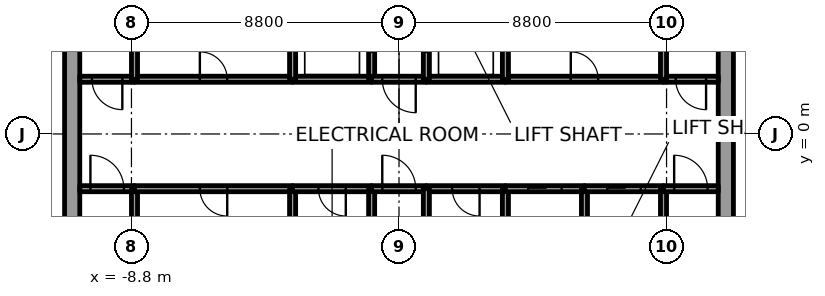
"""IFC4 building model, lengths in metres.
Left out: names, types, materials, properties, quantities, classifications, styles, units other than length and angle.
Written with IfcOpenShell. Run it as: python <this file> out.ifc"""

import sys

from ifc_helpers import new_model, si_unit, direction, frame, frame_2d, origin, place, context, subcontext, project, spatial, rectangle, extrude, element, fill, save


model = new_model("IFC4")
c1 = context("Model", 3, precision=1e-05, world=origin(), true_north=direction((0.0, 1.0)))
c2 = subcontext(c1, "Body", "Model", "MODEL_VIEW")
j1 = project(units=[si_unit("LENGTHUNIT", "METRE"), si_unit("PLANEANGLEUNIT", "RADIAN")], contexts=[c1])
p1 = place(None, origin())
s1 = spatial("IfcSite", under=j1, at=p1, CompositionType="ELEMENT")
p2 = place(p1, origin())
s2 = spatial("IfcBuilding", under=s1, at=p2, CompositionType="ELEMENT")
p3 = place(p2, frame((0.0, 0.0, -9.0)))
s3 = spatial("IfcBuildingStorey", under=s2, at=p3, CompositionType="ELEMENT", Elevation=-9.0)
for number, where, z_axis, x_axis in (
    (1, (-10.75, -7.5, 0.0), (0.0, 0.0, 1.0), (0.0, 1.0, 0.0)),
    (2, (10.75, -7.5, 0.0), (0.0, 0.0, 1.0), (0.0, 1.0, 0.0)),
):
    element("IfcWall", number, at=place(p3, frame(where, z_axis=z_axis, x_axis=x_axis)), inside=s3, PredefinedType="SHEAR", context=c2, shape_type="SweptSolid", body=[
        extrude(rectangle(XDim=15.0, YDim=0.5, at=frame_2d((7.5, 0.0))), origin(), (0.0, 0.0, 1.0), 4.5),
    ])
p4 = place(p3, frame((-10.5, -1.8, 0.0), z_axis=(0.0, 0.0, 1.0), x_axis=(1.0, 0.0, 0.0)))
e3 = element("IfcWall", 3, at=p4, inside=s3, PredefinedType="SOLIDWALL", context=c2, shape_type="SweptSolid", body=[
    extrude(rectangle(XDim=1.8, YDim=0.2, at=frame_2d((0.9, 0.0))), origin(), (0.0, 0.0, 1.0), 4.35),
])
p5 = place(p4, frame((0.35, 0.0, 0.0)))
e4 = element("IfcOpeningElement", 4, at=p5, cuts=e3, PredefinedType="OPENING", context=c2, shape_type="SweptSolid", body=[
    extrude(rectangle(XDim=1.1, YDim=2.4, at=frame_2d((0.55, 1.2))), frame((0.0, 0.1, 0.0), z_axis=(0.0, -1.0, 0.0), x_axis=(1.0, 0.0, 0.0)), (0.0, 0.0, 1.0), 0.2),
])
p6 = place(p3, frame((-8.7, 1.8, 0.0), z_axis=(0.0, 0.0, 1.0), x_axis=(-1.0, 0.0, 0.0)))
e5 = element("IfcWall", 5, at=p6, inside=s3, PredefinedType="SOLIDWALL", context=c2, shape_type="SweptSolid", body=[
    extrude(rectangle(XDim=1.8, YDim=0.2, at=frame_2d((0.9, 0.0))), origin(), (0.0, 0.0, 1.0), 4.35),
])
p7 = place(p6, frame((0.4, 0.0, 0.0)))
e6 = element("IfcOpeningElement", 6, at=p7, cuts=e5, PredefinedType="OPENING", context=c2, shape_type="SweptSolid", body=[
    extrude(rectangle(XDim=1.0, YDim=2.4, at=frame_2d((0.5, 1.2))), frame((0.0, 0.1, 0.0), z_axis=(0.0, -1.0, 0.0), x_axis=(1.0, 0.0, 0.0)), (0.0, 0.0, 1.0), 0.2),
])
p8 = place(p3, frame((-8.7, -1.8, 0.0), z_axis=(0.0, 0.0, 1.0), x_axis=(0.0, -1.0, 0.0)))
e7 = element("IfcWall", 7, at=p8, inside=s3, PredefinedType="SOLIDWALL", context=c2, shape_type="SweptSolid", body=[
    extrude(rectangle(XDim=2.8, YDim=0.2, at=frame_2d((1.4, 0.0))), origin(), (0.0, 0.0, 1.0), 4.35),
])
p9 = place(p3, frame((-3.5, -1.8, 0.0), z_axis=(0.0, 0.0, 1.0), x_axis=(-1.0, 0.0, 0.0)))
e8 = element("IfcWall", 8, at=p9, inside=s3, PredefinedType="SOLIDWALL", context=c2, shape_type="SweptSolid", body=[
    extrude(rectangle(XDim=5.2, YDim=0.2, at=frame_2d((2.6, 0.0))), origin(), (0.0, 0.0, 1.0), 4.35),
])
p10 = place(p9, frame((2.15, 0.0, 0.0)))
e9 = element("IfcOpeningElement", 9, at=p10, cuts=e8, PredefinedType="OPENING", context=c2, shape_type="SweptSolid", body=[
    extrude(rectangle(XDim=0.9, YDim=2.4, at=frame_2d((0.45, 1.2))), frame((0.0, 0.1, 0.0), z_axis=(0.0, -1.0, 0.0), x_axis=(1.0, 0.0, 0.0)), (0.0, 0.0, 1.0), 0.2),
])
p11 = place(p3, frame((-8.7, 1.8, 0.0), z_axis=(0.0, 0.0, 1.0), x_axis=(1.0, 0.0, 0.0)))
e10 = element("IfcWall", 10, at=p11, inside=s3, PredefinedType="SOLIDWALL", context=c2, shape_type="SweptSolid", body=[
    extrude(rectangle(XDim=5.2, YDim=0.2, at=frame_2d((2.6, 0.0))), origin(), (0.0, 0.0, 1.0), 4.35),
])
p12 = place(p11, frame((2.15, 0.0, 0.0)))
e11 = element("IfcOpeningElement", 11, at=p12, cuts=e10, PredefinedType="OPENING", context=c2, shape_type="SweptSolid", body=[
    extrude(rectangle(XDim=0.9, YDim=2.4, at=frame_2d((0.45, 1.2))), frame((0.0, 0.1, 0.0), z_axis=(0.0, -1.0, 0.0), x_axis=(1.0, 0.0, 0.0)), (0.0, 0.0, 1.0), 0.2),
])
for number, where, z_axis, x_axis in (
    (12, (-8.7, 4.6, 0.0), (0.0, 0.0, 1.0), (0.0, -1.0, 0.0)),
    (13, (-3.5, -4.6, 0.0), (0.0, 0.0, 1.0), (0.0, 1.0, 0.0)),
):
    element("IfcWall", number, at=place(p3, frame(where, z_axis=z_axis, x_axis=x_axis)), inside=s3, PredefinedType="SOLIDWALL", context=c2, shape_type="SweptSolid", body=[
        extrude(rectangle(XDim=2.8, YDim=0.2, at=frame_2d((1.4, 0.0))), origin(), (0.0, 0.0, 1.0), 4.35),
    ])
p13 = place(p3, frame((-0.9, -1.8, 0.0), z_axis=(0.0, 0.0, 1.0), x_axis=(-1.0, 0.0, 0.0)))
e14 = element("IfcWall", 14, at=p13, inside=s3, PredefinedType="SOLIDWALL", context=c2, shape_type="SweptSolid", body=[
    extrude(rectangle(XDim=2.6, YDim=0.2, at=frame_2d((1.3, 0.0))), origin(), (0.0, 0.0, 1.0), 4.35),
])
p14 = place(p13, frame((0.85, 0.0, 0.0)))
e15 = element("IfcOpeningElement", 15, at=p14, cuts=e14, PredefinedType="OPENING", context=c2, shape_type="SweptSolid", body=[
    extrude(rectangle(XDim=0.9, YDim=2.4, at=frame_2d((0.45, 1.2))), frame((0.0, 0.1, 0.0), z_axis=(0.0, -1.0, 0.0), x_axis=(1.0, 0.0, 0.0)), (0.0, 0.0, 1.0), 0.2),
])
p15 = place(p3, frame((-0.9, 1.8, 0.0), z_axis=(0.0, 0.0, 1.0), x_axis=(-1.0, 0.0, 0.0)))
e16 = element("IfcWall", 16, at=p15, inside=s3, PredefinedType="SOLIDWALL", context=c2, shape_type="SweptSolid", body=[
    extrude(rectangle(XDim=2.6, YDim=0.2, at=frame_2d((1.3, 0.0))), origin(), (0.0, 0.0, 1.0), 4.35),
])
p16 = place(p3, frame((-3.5, 1.8, 0.0), z_axis=(0.0, 0.0, 1.0), x_axis=(0.0, 1.0, 0.0)))
e17 = element("IfcWall", 17, at=p16, inside=s3, PredefinedType="SOLIDWALL", context=c2, shape_type="SweptSolid", body=[
    extrude(rectangle(XDim=2.8, YDim=0.2, at=frame_2d((1.4, 0.0))), origin(), (0.0, 0.0, 1.0), 4.35),
])
p17 = place(p3, frame((-0.9, 1.8, 0.0), z_axis=(0.0, 0.0, 1.0), x_axis=(0.0, 1.0, 0.0)))
e18 = element("IfcWall", 18, at=p17, inside=s3, PredefinedType="SOLIDWALL", context=c2, shape_type="SweptSolid", body=[
    extrude(rectangle(XDim=3.0, YDim=0.2, at=frame_2d((1.5, 0.0))), origin(), (0.0, 0.0, 1.0), 4.35),
])
p18 = place(p17, frame((0.9, 0.0, 0.0)))
e19 = element("IfcOpeningElement", 19, at=p18, cuts=e18, PredefinedType="OPENING", context=c2, shape_type="SweptSolid", body=[
    extrude(rectangle(XDim=1.2, YDim=2.1, at=frame_2d((0.6, 1.05))), frame((0.0, 0.1, 0.0), z_axis=(0.0, -1.0, 0.0), x_axis=(1.0, 0.0, 0.0)), (0.0, 0.0, 1.0), 0.2),
])
p19 = place(p3, frame((-0.9, -4.6, 0.0), z_axis=(0.0, 0.0, 1.0), x_axis=(0.0, 1.0, 0.0)))
e20 = element("IfcWall", 20, at=p19, inside=s3, PredefinedType="SOLIDWALL", context=c2, shape_type="SweptSolid", body=[
    extrude(rectangle(XDim=2.8, YDim=0.2, at=frame_2d((1.4, 0.0))), origin(), (0.0, 0.0, 1.0), 4.35),
])
p20 = place(p3, frame((-0.9, -1.8, 0.0), z_axis=(0.0, 0.0, 1.0), x_axis=(1.0, 0.0, 0.0)))
e21 = element("IfcWall", 21, at=p20, inside=s3, PredefinedType="SOLIDWALL", context=c2, shape_type="SweptSolid", body=[
    extrude(rectangle(XDim=1.8, YDim=0.2, at=frame_2d((0.9, 0.0))), origin(), (0.0, 0.0, 1.0), 4.35),
])
p21 = place(p20, frame((0.35, 0.0, 0.0)))
e22 = element("IfcOpeningElement", 22, at=p21, cuts=e21, PredefinedType="OPENING", context=c2, shape_type="SweptSolid", body=[
    extrude(rectangle(XDim=1.1, YDim=2.4, at=frame_2d((0.55, 1.2))), frame((0.0, 0.1, 0.0), z_axis=(0.0, -1.0, 0.0), x_axis=(1.0, 0.0, 0.0)), (0.0, 0.0, 1.0), 0.2),
])
p22 = place(p3, frame((0.9, 1.8, 0.0), z_axis=(0.0, 0.0, 1.0), x_axis=(-1.0, 0.0, 0.0)))
e23 = element("IfcWall", 23, at=p22, inside=s3, PredefinedType="SOLIDWALL", context=c2, shape_type="SweptSolid", body=[
    extrude(rectangle(XDim=1.8, YDim=0.2, at=frame_2d((0.9, 0.0))), origin(), (0.0, 0.0, 1.0), 4.35),
])
p23 = place(p22, frame((0.35, 0.0, 0.0)))
e24 = element("IfcOpeningElement", 24, at=p23, cuts=e23, PredefinedType="OPENING", context=c2, shape_type="SweptSolid", body=[
    extrude(rectangle(XDim=1.1, YDim=2.4, at=frame_2d((0.55, 1.2))), frame((0.0, 0.1, 0.0), z_axis=(0.0, -1.0, 0.0), x_axis=(1.0, 0.0, 0.0)), (0.0, 0.0, 1.0), 0.2),
])
p24 = place(p3, frame((3.5, -1.8, 0.0), z_axis=(0.0, 0.0, 1.0), x_axis=(-1.0, 0.0, 0.0)))
e25 = element("IfcWall", 25, at=p24, inside=s3, PredefinedType="SOLIDWALL", context=c2, shape_type="SweptSolid", body=[
    extrude(rectangle(XDim=2.6, YDim=0.2, at=frame_2d((1.3, 0.0))), origin(), (0.0, 0.0, 1.0), 4.35),
])
p25 = place(p24, frame((0.85, 0.0, 0.0)))
e26 = element("IfcOpeningElement", 26, at=p25, cuts=e25, PredefinedType="OPENING", context=c2, shape_type="SweptSolid", body=[
    extrude(rectangle(XDim=0.9, YDim=2.4, at=frame_2d((0.45, 1.2))), frame((0.0, 0.1, 0.0), z_axis=(0.0, -1.0, 0.0), x_axis=(1.0, 0.0, 0.0)), (0.0, 0.0, 1.0), 0.2),
])
p26 = place(p3, frame((0.9, -1.8, 0.0), z_axis=(0.0, 0.0, 1.0), x_axis=(0.0, -1.0, 0.0)))
e27 = element("IfcWall", 27, at=p26, inside=s3, PredefinedType="SOLIDWALL", context=c2, shape_type="SweptSolid", body=[
    extrude(rectangle(XDim=2.8, YDim=0.2, at=frame_2d((1.4, 0.0))), origin(), (0.0, 0.0, 1.0), 4.35),
])
p27 = place(p3, frame((3.5, 1.8, 0.0), z_axis=(0.0, 0.0, 1.0), x_axis=(-1.0, 0.0, 0.0)))
e28 = element("IfcWall", 28, at=p27, inside=s3, PredefinedType="SOLIDWALL", context=c2, shape_type="SweptSolid", body=[
    extrude(rectangle(XDim=2.6, YDim=0.2, at=frame_2d((1.3, 0.0))), origin(), (0.0, 0.0, 1.0), 4.35),
])
p28 = place(p3, frame((0.9, 4.8, 0.0), z_axis=(0.0, 0.0, 1.0), x_axis=(0.0, -1.0, 0.0)))
e29 = element("IfcWall", 29, at=p28, inside=s3, PredefinedType="SOLIDWALL", context=c2, shape_type="SweptSolid", body=[
    extrude(rectangle(XDim=3.0, YDim=0.2, at=frame_2d((1.5, 0.0))), origin(), (0.0, 0.0, 1.0), 4.35),
])
p29 = place(p28, frame((0.9, 0.0, 0.0)))
e30 = element("IfcOpeningElement", 30, at=p29, cuts=e29, PredefinedType="OPENING", context=c2, shape_type="SweptSolid", body=[
    extrude(rectangle(XDim=1.2, YDim=2.1, at=frame_2d((0.6, 1.05))), frame((0.0, 0.1, 0.0), z_axis=(0.0, -1.0, 0.0), x_axis=(1.0, 0.0, 0.0)), (0.0, 0.0, 1.0), 0.2),
])
p30 = place(p3, frame((3.5, -4.6, 0.0), z_axis=(0.0, 0.0, 1.0), x_axis=(0.0, 1.0, 0.0)))
e31 = element("IfcWall", 31, at=p30, inside=s3, PredefinedType="SOLIDWALL", context=c2, shape_type="SweptSolid", body=[
    extrude(rectangle(XDim=2.8, YDim=0.2, at=frame_2d((1.4, 0.0))), origin(), (0.0, 0.0, 1.0), 4.35),
])
p31 = place(p3, frame((3.5, -1.8, 0.0), z_axis=(0.0, 0.0, 1.0), x_axis=(1.0, 0.0, 0.0)))
e32 = element("IfcWall", 32, at=p31, inside=s3, PredefinedType="SOLIDWALL", context=c2, shape_type="SweptSolid", body=[
    extrude(rectangle(XDim=2.6, YDim=0.2, at=frame_2d((1.3, 0.0))), origin(), (0.0, 0.0, 1.0), 4.35),
])
p32 = place(p31, frame((0.75, 0.0, 0.0)))
e33 = element("IfcOpeningElement", 33, at=p32, cuts=e32, PredefinedType="OPENING", context=c2, shape_type="SweptSolid", body=[
    extrude(rectangle(XDim=1.1, YDim=2.1, at=frame_2d((0.55, 1.05))), frame((0.0, 0.1, 0.0), z_axis=(0.0, -1.0, 0.0), x_axis=(1.0, 0.0, 0.0)), (0.0, 0.0, 1.0), 0.2),
])
p33 = place(p3, frame((3.5, 1.8, 0.0), z_axis=(0.0, 0.0, 1.0), x_axis=(1.0, 0.0, 0.0)))
e34 = element("IfcWall", 34, at=p33, inside=s3, PredefinedType="SOLIDWALL", context=c2, shape_type="SweptSolid", body=[
    extrude(rectangle(XDim=5.2, YDim=0.2, at=frame_2d((2.6, 0.0))), origin(), (0.0, 0.0, 1.0), 4.35),
])
p34 = place(p33, frame((2.15, 0.0, 0.0)))
e35 = element("IfcOpeningElement", 35, at=p34, cuts=e34, PredefinedType="OPENING", context=c2, shape_type="SweptSolid", body=[
    extrude(rectangle(XDim=0.9, YDim=2.4, at=frame_2d((0.45, 1.2))), frame((0.0, 0.1, 0.0), z_axis=(0.0, -1.0, 0.0), x_axis=(1.0, 0.0, 0.0)), (0.0, 0.0, 1.0), 0.2),
])
for number, where, z_axis, x_axis in (
    (36, (3.5, 4.6, 0.0), (0.0, 0.0, 1.0), (0.0, -1.0, 0.0)),
    (37, (6.1, -4.6, 0.0), (0.0, 0.0, 1.0), (0.0, 1.0, 0.0)),
):
    element("IfcWall", number, at=place(p3, frame(where, z_axis=z_axis, x_axis=x_axis)), inside=s3, PredefinedType="SOLIDWALL", context=c2, shape_type="SweptSolid", body=[
        extrude(rectangle(XDim=2.8, YDim=0.2, at=frame_2d((1.4, 0.0))), origin(), (0.0, 0.0, 1.0), 4.35),
    ])
p35 = place(p3, frame((6.1, -1.8, 0.0), z_axis=(0.0, 0.0, 1.0), x_axis=(1.0, 0.0, 0.0)))
e38 = element("IfcWall", 38, at=p35, inside=s3, PredefinedType="SOLIDWALL", context=c2, shape_type="SweptSolid", body=[
    extrude(rectangle(XDim=2.6, YDim=0.2, at=frame_2d((1.3, 0.0))), origin(), (0.0, 0.0, 1.0), 4.35),
])
p36 = place(p35, frame((0.75, 0.0, 0.0)))
e39 = element("IfcOpeningElement", 39, at=p36, cuts=e38, PredefinedType="OPENING", context=c2, shape_type="SweptSolid", body=[
    extrude(rectangle(XDim=1.1, YDim=2.1, at=frame_2d((0.55, 1.05))), frame((0.0, 0.1, 0.0), z_axis=(0.0, -1.0, 0.0), x_axis=(1.0, 0.0, 0.0)), (0.0, 0.0, 1.0), 0.2),
])
p37 = place(p3, frame((8.7, -1.8, 0.0), z_axis=(0.0, 0.0, 1.0), x_axis=(0.0, -1.0, 0.0)))
e40 = element("IfcWall", 40, at=p37, inside=s3, PredefinedType="SOLIDWALL", context=c2, shape_type="SweptSolid", body=[
    extrude(rectangle(XDim=2.8, YDim=0.2, at=frame_2d((1.4, 0.0))), origin(), (0.0, 0.0, 1.0), 4.35),
])
p38 = place(p3, frame((8.7, -1.8, 0.0), z_axis=(0.0, 0.0, 1.0), x_axis=(1.0, 0.0, 0.0)))
e41 = element("IfcWall", 41, at=p38, inside=s3, PredefinedType="SOLIDWALL", context=c2, shape_type="SweptSolid", body=[
    extrude(rectangle(XDim=1.8, YDim=0.2, at=frame_2d((0.9, 0.0))), origin(), (0.0, 0.0, 1.0), 4.35),
])
p39 = place(p38, frame((0.35, 0.0, 0.0)))
e42 = element("IfcOpeningElement", 42, at=p39, cuts=e41, PredefinedType="OPENING", context=c2, shape_type="SweptSolid", body=[
    extrude(rectangle(XDim=1.1, YDim=2.4, at=frame_2d((0.55, 1.2))), frame((0.0, 0.1, 0.0), z_axis=(0.0, -1.0, 0.0), x_axis=(1.0, 0.0, 0.0)), (0.0, 0.0, 1.0), 0.2),
])
p40 = place(p3, frame((10.5, 1.8, 0.0), z_axis=(0.0, 0.0, 1.0), x_axis=(-1.0, 0.0, 0.0)))
e43 = element("IfcWall", 43, at=p40, inside=s3, PredefinedType="SOLIDWALL", context=c2, shape_type="SweptSolid", body=[
    extrude(rectangle(XDim=1.8, YDim=0.2, at=frame_2d((0.9, 0.0))), origin(), (0.0, 0.0, 1.0), 4.35),
])
p41 = place(p40, frame((0.4, 0.0, 0.0)))
e44 = element("IfcOpeningElement", 44, at=p41, cuts=e43, PredefinedType="OPENING", context=c2, shape_type="SweptSolid", body=[
    extrude(rectangle(XDim=1.0, YDim=2.4, at=frame_2d((0.5, 1.2))), frame((0.0, 0.1, 0.0), z_axis=(0.0, -1.0, 0.0), x_axis=(1.0, 0.0, 0.0)), (0.0, 0.0, 1.0), 0.2),
])
p42 = place(p3, frame((8.7, 1.8, 0.0), z_axis=(0.0, 0.0, 1.0), x_axis=(0.0, 1.0, 0.0)))
e45 = element("IfcWall", 45, at=p42, inside=s3, PredefinedType="SOLIDWALL", context=c2, shape_type="SweptSolid", body=[
    extrude(rectangle(XDim=2.8, YDim=0.2, at=frame_2d((1.4, 0.0))), origin(), (0.0, 0.0, 1.0), 4.35),
])
p43 = place(p32, origin())
e46 = element("IfcDoor", 46, at=p43, inside=s3, OperationType="SLIDING_TO_LEFT", PredefinedType="DOOR", context=c2, shape_type="SweptSolid", body=[
    extrude(rectangle(XDim=1.1, YDim=2.1, at=frame_2d((0.55, 1.05))), frame((0.0, 0.025, 0.0), z_axis=(0.0, -1.0, 0.0), x_axis=(1.0, 0.0, 0.0)), (0.0, 0.0, 1.0), 0.05),
])
fill(e33, e46)
p44 = place(p36, origin())
e47 = element("IfcDoor", 47, at=p44, inside=s3, OperationType="SLIDING_TO_RIGHT", PredefinedType="DOOR", context=c2, shape_type="SweptSolid", body=[
    extrude(rectangle(XDim=1.1, YDim=2.1, at=frame_2d((0.55, 1.05))), frame((0.0, 0.025, 0.0), z_axis=(0.0, -1.0, 0.0), x_axis=(1.0, 0.0, 0.0)), (0.0, 0.0, 1.0), 0.05),
])
fill(e39, e47)
p45 = place(p5, origin())
e48 = element("IfcDoor", 48, at=p45, inside=s3, OperationType="SINGLE_SWING_LEFT", PredefinedType="DOOR", context=c2, shape_type="SweptSolid", body=[
    extrude(rectangle(XDim=1.1, YDim=2.4, at=frame_2d((0.55, 1.2))), frame((0.0, 0.025, 0.0), z_axis=(0.0, -1.0, 0.0), x_axis=(1.0, 0.0, 0.0)), (0.0, 0.0, 1.0), 0.05),
])
fill(e4, e48)
p46 = place(p39, origin())
e49 = element("IfcDoor", 49, at=p46, inside=s3, OperationType="SINGLE_SWING_LEFT", PredefinedType="DOOR", context=c2, shape_type="SweptSolid", body=[
    extrude(rectangle(XDim=1.1, YDim=2.4, at=frame_2d((0.55, 1.2))), frame((0.0, 0.025, 0.0), z_axis=(0.0, -1.0, 0.0), x_axis=(1.0, 0.0, 0.0)), (0.0, 0.0, 1.0), 0.05),
])
fill(e42, e49)
p47 = place(p23, origin())
e50 = element("IfcDoor", 50, at=p47, inside=s3, OperationType="SINGLE_SWING_LEFT", PredefinedType="DOOR", context=c2, shape_type="SweptSolid", body=[
    extrude(rectangle(XDim=1.1, YDim=2.4, at=frame_2d((0.55, 1.2))), frame((0.0, 0.025, 0.0), z_axis=(0.0, -1.0, 0.0), x_axis=(1.0, 0.0, 0.0)), (0.0, 0.0, 1.0), 0.05),
])
fill(e24, e50)
p48 = place(p21, origin())
e51 = element("IfcDoor", 51, at=p48, inside=s3, OperationType="SINGLE_SWING_LEFT", PredefinedType="DOOR", context=c2, shape_type="SweptSolid", body=[
    extrude(rectangle(XDim=1.1, YDim=2.4, at=frame_2d((0.55, 1.2))), frame((0.0, 0.025, 0.0), z_axis=(0.0, -1.0, 0.0), x_axis=(1.0, 0.0, 0.0)), (0.0, 0.0, 1.0), 0.05),
])
fill(e22, e51)
p49 = place(p7, origin())
e52 = element("IfcDoor", 52, at=p49, inside=s3, OperationType="SINGLE_SWING_LEFT", PredefinedType="DOOR", context=c2, shape_type="SweptSolid", body=[
    extrude(rectangle(XDim=1.0, YDim=2.4, at=frame_2d((0.5, 1.2))), frame((0.0, 0.025, 0.0), z_axis=(0.0, -1.0, 0.0), x_axis=(1.0, 0.0, 0.0)), (0.0, 0.0, 1.0), 0.05),
])
fill(e6, e52)
p50 = place(p41, origin())
e53 = element("IfcDoor", 53, at=p50, inside=s3, OperationType="SINGLE_SWING_RIGHT", PredefinedType="DOOR", context=c2, shape_type="SweptSolid", body=[
    extrude(rectangle(XDim=1.0, YDim=2.4, at=frame_2d((0.5, 1.2))), frame((0.0, 0.025, 0.0), z_axis=(0.0, -1.0, 0.0), x_axis=(1.0, 0.0, 0.0)), (0.0, 0.0, 1.0), 0.05),
])
fill(e44, e53)
p51 = place(p34, origin())
e54 = element("IfcDoor", 54, at=p51, inside=s3, OperationType="SINGLE_SWING_LEFT", PredefinedType="DOOR", context=c2, shape_type="SweptSolid", body=[
    extrude(rectangle(XDim=0.9, YDim=2.4, at=frame_2d((0.45, 1.2))), frame((0.0, 0.025, 0.0), z_axis=(0.0, -1.0, 0.0), x_axis=(1.0, 0.0, 0.0)), (0.0, 0.0, 1.0), 0.05),
])
fill(e35, e54)
p52 = place(p10, origin())
e55 = element("IfcDoor", 55, at=p52, inside=s3, OperationType="SINGLE_SWING_RIGHT", PredefinedType="DOOR", context=c2, shape_type="SweptSolid", body=[
    extrude(rectangle(XDim=0.9, YDim=2.4, at=frame_2d((0.45, 1.2))), frame((0.0, 0.025, 0.0), z_axis=(0.0, -1.0, 0.0), x_axis=(1.0, 0.0, 0.0)), (0.0, 0.0, 1.0), 0.05),
])
fill(e9, e55)
p53 = place(p14, origin())
e56 = element("IfcDoor", 56, at=p53, inside=s3, OperationType="SINGLE_SWING_LEFT", PredefinedType="DOOR", context=c2, shape_type="SweptSolid", body=[
    extrude(rectangle(XDim=0.9, YDim=2.4, at=frame_2d((0.45, 1.2))), frame((0.0, 0.025, 0.0), z_axis=(0.0, -1.0, 0.0), x_axis=(1.0, 0.0, 0.0)), (0.0, 0.0, 1.0), 0.05),
])
fill(e15, e56)
p54 = place(p25, origin())
e57 = element("IfcDoor", 57, at=p54, inside=s3, OperationType="SINGLE_SWING_RIGHT", PredefinedType="DOOR", context=c2, shape_type="SweptSolid", body=[
    extrude(rectangle(XDim=0.9, YDim=2.4, at=frame_2d((0.45, 1.2))), frame((0.0, 0.025, 0.0), z_axis=(0.0, -1.0, 0.0), x_axis=(1.0, 0.0, 0.0)), (0.0, 0.0, 1.0), 0.05),
])
fill(e26, e57)
p55 = place(p12, origin())
e58 = element("IfcDoor", 58, at=p55, inside=s3, OperationType="SINGLE_SWING_LEFT", PredefinedType="DOOR", context=c2, shape_type="SweptSolid", body=[
    extrude(rectangle(XDim=0.9, YDim=2.4, at=frame_2d((0.45, 1.2))), frame((0.0, 0.025, 0.0), z_axis=(0.0, -1.0, 0.0), x_axis=(1.0, 0.0, 0.0)), (0.0, 0.0, 1.0), 0.05),
])
fill(e11, e58)
save(model, sys.argv[1])
